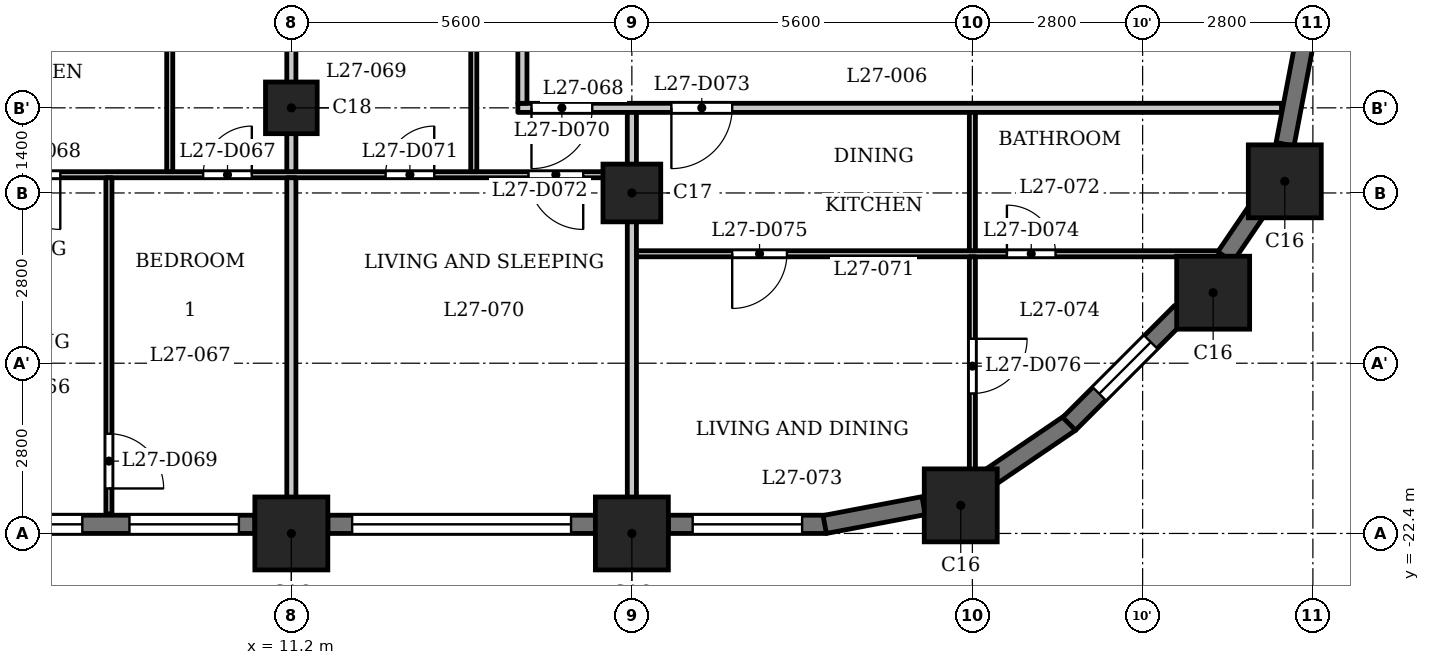
"""IFC4 building model, lengths in metres.
Left out: names, types, materials, properties, quantities, classifications, styles, units other than length and angle.
Written with IfcOpenShell. Run it as: python <this file> out.ifc"""

import sys

from ifc_helpers import new_model, si_unit, direction, frame, frame_2d, origin, origin_2d, place, context, subcontext, project, spatial, rectangle, extrude, element, fill, save


model = new_model("IFC4")
c1 = context("Model", 3, precision=1e-05, world=origin(), true_north=direction((0.0, 1.0)))
c2 = subcontext(c1, "Body", "Model", "MODEL_VIEW")
j1 = project(units=[si_unit("LENGTHUNIT", "METRE"), si_unit("PLANEANGLEUNIT", "RADIAN")], contexts=[c1])
p1 = place(None, origin())
s1 = spatial("IfcSite", under=j1, at=p1, CompositionType="ELEMENT")
p2 = place(p1, origin())
s2 = spatial("IfcBuilding", under=s1, at=p2, CompositionType="ELEMENT")
p3 = place(p2, frame((0.0, 0.0, 107.8)))
s3 = spatial("IfcBuildingStorey", under=s2, at=p3, CompositionType="ELEMENT", Elevation=107.8)
for number, where, z_axis, x_axis in (
    (1, (11.2, -22.4, 0.0), (0.0, 0.0, 1.0), (1.0, 0.0, 0.0)),
    (2, (16.8, -22.4, 0.0), (0.0, 0.0, 1.0), (1.0, 0.0, 0.0)),
    (3, (22.209, -21.938, 0.0), (0.0, 0.0, 1.0), (1.0, 0.0, 0.0)),
    (4, (26.36, -18.44, 0.0), (0.0, 0.0, 1.0), (1.0, 0.0, 0.0)),
    (5, (27.538, -16.609, 0.0), (0.0, 0.0, 1.0), (1.0, 0.0, 0.0)),
):
    element("IfcColumn", number, at=place(p3, frame(where, z_axis=z_axis, x_axis=x_axis)), inside=s3, PredefinedType="COLUMN", context=c2, shape_type="SweptSolid", body=[
        extrude(rectangle(XDim=1.2, YDim=1.2, at=origin_2d()), origin(), (0.0, 0.0, 1.0), 3.5),
    ])
p4 = place(p3, frame((16.8, -16.8, 0.0), z_axis=(0.0, 0.0, 1.0), x_axis=(1.0, 0.0, 0.0)))
e6 = element("IfcColumn", 6, at=p4, inside=s3, PredefinedType="COLUMN", context=c2, shape_type="SweptSolid", body=[
    extrude(rectangle(XDim=0.95, YDim=0.95, at=origin_2d()), origin(), (0.0, 0.0, 1.0), 3.5),
])
p5 = place(p3, frame((11.2, -15.4, 0.0), z_axis=(0.0, 0.0, 1.0), x_axis=(1.0, 0.0, 0.0)))
e7 = element("IfcColumn", 7, at=p5, inside=s3, PredefinedType="COLUMN", context=c2, shape_type="SweptSolid", body=[
    extrude(rectangle(XDim=0.85, YDim=0.85, at=origin_2d()), origin(), (0.0, 0.0, 1.0), 3.5),
])
p6 = place(p3, frame((6.2, -22.25, 0.0), z_axis=(0.0, 0.0, 1.0), x_axis=(1.0, 0.0, 0.0)))
e8 = element("IfcWall", 8, at=p6, inside=s3, PredefinedType="SOLIDWALL", context=c2, shape_type="SweptSolid", body=[
    extrude(rectangle(XDim=4.4, YDim=0.3, at=frame_2d((2.2, 0.0))), origin(), (0.0, 0.0, 1.0), 2.4),
])
p7 = place(p6, frame((0.363, 0.0, 0.6)))
e9 = element("IfcOpeningElement", 9, at=p7, cuts=e8, PredefinedType="OPENING", context=c2, shape_type="SweptSolid", body=[
    extrude(rectangle(XDim=1.2, YDim=1.55, at=frame_2d((0.6, 0.775))), frame((0.0, 0.16, 0.0), z_axis=(0.0, -1.0, 0.0), x_axis=(1.0, 0.0, 0.0)), (0.0, 0.0, 1.0), 0.32),
])
p8 = place(p6, frame((2.337, 0.0, 0.9)))
e10 = element("IfcOpeningElement", 10, at=p8, cuts=e8, PredefinedType="OPENING", context=c2, shape_type="SweptSolid", body=[
    extrude(rectangle(XDim=1.8, YDim=1.25, at=frame_2d((0.9, 0.625))), frame((0.0, 0.16, 0.0), z_axis=(0.0, -1.0, 0.0), x_axis=(1.0, 0.0, 0.0)), (0.0, 0.0, 1.0), 0.32),
])
p9 = place(p3, frame((11.8, -22.25, 0.0), z_axis=(0.0, 0.0, 1.0), x_axis=(1.0, 0.0, 0.0)))
e11 = element("IfcWall", 11, at=p9, inside=s3, PredefinedType="SOLIDWALL", context=c2, shape_type="SweptSolid", body=[
    extrude(rectangle(XDim=4.4, YDim=0.3, at=frame_2d((2.2, 0.0))), origin(), (0.0, 0.0, 1.0), 2.4),
])
p10 = place(p9, frame((0.4, 0.0, 1.2)))
e12 = element("IfcOpeningElement", 12, at=p10, cuts=e11, PredefinedType="OPENING", context=c2, shape_type="SweptSolid", body=[
    extrude(rectangle(XDim=3.6, YDim=0.95, at=frame_2d((1.8, 0.475))), frame((0.0, 0.16, 0.0), z_axis=(0.0, -1.0, 0.0), x_axis=(1.0, 0.0, 0.0)), (0.0, 0.0, 1.0), 0.32),
])
p11 = place(p3, frame((17.4, -22.25, 0.0), z_axis=(0.0, 0.0, 1.0), x_axis=(1.0, 0.0, 0.0)))
e13 = element("IfcWall", 13, at=p11, inside=s3, PredefinedType="SOLIDWALL", context=c2, shape_type="SweptSolid", body=[
    extrude(rectangle(XDim=2.6, YDim=0.3, at=frame_2d((1.3, 0.0))), origin(), (0.0, 0.0, 1.0), 2.4),
])
p12 = place(p11, frame((0.4, 0.0, 0.9)))
e14 = element("IfcOpeningElement", 14, at=p12, cuts=e13, PredefinedType="OPENING", context=c2, shape_type="SweptSolid", body=[
    extrude(rectangle(XDim=1.8, YDim=1.25, at=frame_2d((0.9, 0.625))), frame((0.0, 0.16, 0.0), z_axis=(0.0, -1.0, 0.0), x_axis=(1.0, 0.0, 0.0)), (0.0, 0.0, 1.0), 0.32),
])
for number, where, z_axis, x_axis in (
    (15, (19.972, -22.253, 0.0), (0.0, 0.0, 1.0), (0.982, 0.187, 0.0)),
    (16, (22.643, -21.51, 0.0), (0.0, 0.0, 1.0), (0.827, 0.562, 0.0)),
):
    element("IfcWall", number, at=place(p3, frame(where, z_axis=z_axis, x_axis=x_axis)), inside=s3, PredefinedType="SOLIDWALL", context=c2, shape_type="SweptSolid", body=[
        extrude(rectangle(XDim=1.656, YDim=0.3, at=frame_2d((0.828, 0.0))), origin(), (0.0, 0.0, 1.0), 2.4),
    ])
p13 = place(p3, frame((23.991, -20.597, 0.0), z_axis=(0.0, 0.0, 1.0), x_axis=(0.707106781187, 0.707106781187, 0.0)))
e17 = element("IfcWall", 17, at=p13, inside=s3, PredefinedType="SOLIDWALL", context=c2, shape_type="SweptSolid", body=[
    extrude(rectangle(XDim=2.6, YDim=0.3, at=frame_2d((1.3, 0.0))), origin(), (0.0, 0.0, 1.0), 2.4),
])
p14 = place(p13, frame((0.7, 0.0, 0.6)))
e18 = element("IfcOpeningElement", 18, at=p14, cuts=e17, PredefinedType="OPENING", context=c2, shape_type="SweptSolid", body=[
    extrude(rectangle(XDim=1.2, YDim=1.55, at=frame_2d((0.6, 0.775))), frame((0.0, 0.16, 0.0), z_axis=(0.0, -1.0, 0.0), x_axis=(1.0, 0.0, 0.0)), (0.0, 0.0, 1.0), 0.32),
])
p15 = place(p3, frame((26.561, -17.851, 0.0), z_axis=(0.0, 0.0, 1.0), x_axis=(0.562173331661, 0.827019434577, 0.0)))
e19 = element("IfcWall", 19, at=p15, inside=s3, PredefinedType="SOLIDWALL", context=c2, shape_type="SweptSolid", body=[
    extrude(rectangle(XDim=0.977, YDim=0.3, at=frame_2d((0.489, 0.0))), origin(), (0.0, 0.0, 1.0), 3.2),
])
p16 = place(p3, frame((27.542, -15.999, 0.0), z_axis=(0.0, 0.0, 1.0), x_axis=(0.187349172861, 0.982293381546, 0.0)))
e20 = element("IfcWall", 20, at=p16, inside=s3, PredefinedType="SOLIDWALL", context=c2, shape_type="SweptSolid", body=[
    extrude(rectangle(XDim=1.656, YDim=0.3, at=frame_2d((0.828, 0.0))), origin(), (0.0, 0.0, 1.0), 2.4),
])
p17 = place(p3, frame((16.875, -17.8, 0.0), z_axis=(0.0, 0.0, 1.0), x_axis=(1.0, 0.0, 0.0)))
e21 = element("IfcWall", 21, at=p17, inside=s3, PredefinedType="PARTITIONING", context=c2, shape_type="SweptSolid", body=[
    extrude(rectangle(XDim=9.59, YDim=0.1, at=frame_2d((4.795, 0.0))), origin(), (0.0, 0.0, 1.0), 3.2),
])
p18 = place(p17, frame((6.093, 0.0, 0.0)))
e22 = element("IfcOpeningElement", 22, at=p18, cuts=e21, PredefinedType="OPENING", context=c2, shape_type="SweptSolid", body=[
    extrude(rectangle(XDim=0.8, YDim=2.1, at=frame_2d((0.4, 1.05))), frame((0.0, 0.06, 0.0), z_axis=(0.0, -1.0, 0.0), x_axis=(1.0, 0.0, 0.0)), (0.0, 0.0, 1.0), 0.12),
])
p19 = place(p17, frame((1.575, 0.0, 0.0)))
e23 = element("IfcOpeningElement", 23, at=p19, cuts=e21, PredefinedType="OPENING", context=c2, shape_type="SweptSolid", body=[
    extrude(rectangle(XDim=0.9, YDim=2.1, at=frame_2d((0.45, 1.05))), frame((0.0, 0.06, 0.0), z_axis=(0.0, -1.0, 0.0), x_axis=(1.0, 0.0, 0.0)), (0.0, 0.0, 1.0), 0.12),
])
p20 = place(p3, frame((-16.725, -16.5, 0.0), z_axis=(0.0, 0.0, 1.0), x_axis=(1.0, 0.0, 0.0)))
e24 = element("IfcWall", 24, at=p20, inside=s3, PredefinedType="PARTITIONING", context=c2, shape_type="SweptSolid", body=[
    extrude(rectangle(XDim=33.45, YDim=0.1, at=frame_2d((16.725, 0.0))), origin(), (0.0, 0.0, 1.0), 3.2),
])
p21 = place(p20, frame((4.075, 0.0, 0.0)))
e25 = element("IfcOpeningElement", 25, at=p21, cuts=e24, PredefinedType="OPENING", context=c2, shape_type="SweptSolid", body=[
    extrude(rectangle(XDim=0.8, YDim=2.1, at=frame_2d((0.4, 1.05))), frame((0.0, 0.06, 0.0), z_axis=(0.0, -1.0, 0.0), x_axis=(1.0, 0.0, 0.0)), (0.0, 0.0, 1.0), 0.12),
])
p22 = place(p20, frame((1.075, 0.0, 0.0)))
e26 = element("IfcOpeningElement", 26, at=p22, cuts=e24, PredefinedType="OPENING", context=c2, shape_type="SweptSolid", body=[
    extrude(rectangle(XDim=0.9, YDim=2.1, at=frame_2d((0.45, 1.05))), frame((0.0, 0.06, 0.0), z_axis=(0.0, -1.0, 0.0), x_axis=(1.0, 0.0, 0.0)), (0.0, 0.0, 1.0), 0.12),
])
p23 = place(p20, frame((9.675, 0.0, 0.0)))
e27 = element("IfcOpeningElement", 27, at=p23, cuts=e24, PredefinedType="OPENING", context=c2, shape_type="SweptSolid", body=[
    extrude(rectangle(XDim=0.8, YDim=2.1, at=frame_2d((0.4, 1.05))), frame((0.0, 0.06, 0.0), z_axis=(0.0, -1.0, 0.0), x_axis=(1.0, 0.0, 0.0)), (0.0, 0.0, 1.0), 0.12),
])
p24 = place(p20, frame((7.675, 0.0, 0.0)))
e28 = element("IfcOpeningElement", 28, at=p24, cuts=e24, PredefinedType="OPENING", context=c2, shape_type="SweptSolid", body=[
    extrude(rectangle(XDim=0.9, YDim=2.1, at=frame_2d((0.45, 1.05))), frame((0.0, 0.06, 0.0), z_axis=(0.0, -1.0, 0.0), x_axis=(1.0, 0.0, 0.0)), (0.0, 0.0, 1.0), 0.12),
])
p25 = place(p20, frame((15.275, 0.0, 0.0)))
e29 = element("IfcOpeningElement", 29, at=p25, cuts=e24, PredefinedType="OPENING", context=c2, shape_type="SweptSolid", body=[
    extrude(rectangle(XDim=0.8, YDim=2.1, at=frame_2d((0.4, 1.05))), frame((0.0, 0.06, 0.0), z_axis=(0.0, -1.0, 0.0), x_axis=(1.0, 0.0, 0.0)), (0.0, 0.0, 1.0), 0.12),
])
p26 = place(p20, frame((11.775, 0.0, 0.0)))
e30 = element("IfcOpeningElement", 30, at=p26, cuts=e24, PredefinedType="OPENING", context=c2, shape_type="SweptSolid", body=[
    extrude(rectangle(XDim=0.9, YDim=2.1, at=frame_2d((0.45, 1.05))), frame((0.0, 0.06, 0.0), z_axis=(0.0, -1.0, 0.0), x_axis=(1.0, 0.0, 0.0)), (0.0, 0.0, 1.0), 0.12),
])
p27 = place(p20, frame((20.625, 0.0, 0.0)))
e31 = element("IfcOpeningElement", 31, at=p27, cuts=e24, PredefinedType="OPENING", context=c2, shape_type="SweptSolid", body=[
    extrude(rectangle(XDim=0.8, YDim=2.1, at=frame_2d((0.4, 1.05))), frame((0.0, 0.06, 0.0), z_axis=(0.0, -1.0, 0.0), x_axis=(1.0, 0.0, 0.0)), (0.0, 0.0, 1.0), 0.12),
])
p28 = place(p20, frame((18.375, 0.0, 0.0)))
e32 = element("IfcOpeningElement", 32, at=p28, cuts=e24, PredefinedType="OPENING", context=c2, shape_type="SweptSolid", body=[
    extrude(rectangle(XDim=0.9, YDim=2.1, at=frame_2d((0.45, 1.05))), frame((0.0, 0.06, 0.0), z_axis=(0.0, -1.0, 0.0), x_axis=(1.0, 0.0, 0.0)), (0.0, 0.0, 1.0), 0.12),
])
p29 = place(p20, frame((26.475, 0.0, 0.0)))
e33 = element("IfcOpeningElement", 33, at=p29, cuts=e24, PredefinedType="OPENING", context=c2, shape_type="SweptSolid", body=[
    extrude(rectangle(XDim=0.8, YDim=2.1, at=frame_2d((0.4, 1.05))), frame((0.0, 0.06, 0.0), z_axis=(0.0, -1.0, 0.0), x_axis=(1.0, 0.0, 0.0)), (0.0, 0.0, 1.0), 0.12),
])
p30 = place(p20, frame((23.225, 0.0, 0.0)))
e34 = element("IfcOpeningElement", 34, at=p30, cuts=e24, PredefinedType="OPENING", context=c2, shape_type="SweptSolid", body=[
    extrude(rectangle(XDim=0.9, YDim=2.1, at=frame_2d((0.45, 1.05))), frame((0.0, 0.06, 0.0), z_axis=(0.0, -1.0, 0.0), x_axis=(1.0, 0.0, 0.0)), (0.0, 0.0, 1.0), 0.12),
])
p31 = place(p20, frame((29.475, 0.0, 0.0)))
e35 = element("IfcOpeningElement", 35, at=p31, cuts=e24, PredefinedType="OPENING", context=c2, shape_type="SweptSolid", body=[
    extrude(rectangle(XDim=0.8, YDim=2.1, at=frame_2d((0.4, 1.05))), frame((0.0, 0.06, 0.0), z_axis=(0.0, -1.0, 0.0), x_axis=(1.0, 0.0, 0.0)), (0.0, 0.0, 1.0), 0.12),
])
p32 = place(p20, frame((31.825, 0.0, 0.0)))
e36 = element("IfcOpeningElement", 36, at=p32, cuts=e24, PredefinedType="OPENING", context=c2, shape_type="SweptSolid", body=[
    extrude(rectangle(XDim=0.9, YDim=2.1, at=frame_2d((0.45, 1.05))), frame((0.0, 0.06, 0.0), z_axis=(0.0, -1.0, 0.0), x_axis=(1.0, 0.0, 0.0)), (0.0, 0.0, 1.0), 0.12),
])
p33 = place(p3, frame((14.925, -15.4, 0.0), z_axis=(0.0, 0.0, 1.0), x_axis=(1.0, 0.0, 0.0)))
e37 = element("IfcWall", 37, at=p33, inside=s3, PredefinedType="PARTITIONING", context=c2, shape_type="SweptSolid", body=[
    extrude(rectangle(XDim=12.559, YDim=0.15, at=frame_2d((6.279, 0.0))), origin(), (0.0, 0.0, 1.0), 3.2),
])
p34 = place(p33, frame((0.224, 0.0, 0.0)))
e38 = element("IfcOpeningElement", 38, at=p34, cuts=e37, PredefinedType="OPENING", context=c2, shape_type="SweptSolid", body=[
    extrude(rectangle(XDim=1.0, YDim=2.1, at=frame_2d((0.5, 1.05))), frame((0.0, 0.085, 0.0), z_axis=(0.0, -1.0, 0.0), x_axis=(1.0, 0.0, 0.0)), (0.0, 0.0, 1.0), 0.17),
])
p35 = place(p33, frame((2.525, 0.0, 0.0)))
e39 = element("IfcOpeningElement", 39, at=p35, cuts=e37, PredefinedType="OPENING", context=c2, shape_type="SweptSolid", body=[
    extrude(rectangle(XDim=1.0, YDim=2.1, at=frame_2d((0.5, 1.05))), frame((0.0, 0.085, 0.0), z_axis=(0.0, -1.0, 0.0), x_axis=(1.0, 0.0, 0.0)), (0.0, 0.0, 1.0), 0.17),
])
p36 = place(p3, frame((8.2, -22.08, 0.0), z_axis=(0.0, 0.0, 1.0), x_axis=(0.0, 1.0, 0.0)))
e40 = element("IfcWall", 40, at=p36, inside=s3, PredefinedType="PARTITIONING", context=c2, shape_type="SweptSolid", body=[
    extrude(rectangle(XDim=5.53, YDim=0.1, at=frame_2d((2.765, 0.0))), origin(), (0.0, 0.0, 1.0), 3.2),
])
p37 = place(p36, frame((0.42, 0.0, 0.0)))
e41 = element("IfcOpeningElement", 41, at=p37, cuts=e40, PredefinedType="OPENING", context=c2, shape_type="SweptSolid", body=[
    extrude(rectangle(XDim=0.9, YDim=2.1, at=frame_2d((0.45, 1.05))), frame((0.0, 0.06, 0.0), z_axis=(0.0, -1.0, 0.0), x_axis=(1.0, 0.0, 0.0)), (0.0, 0.0, 1.0), 0.12),
])
p38 = place(p3, frame((9.2, -16.45, 0.0), z_axis=(0.0, 0.0, 1.0), x_axis=(0.0, 1.0, 0.0)))
e42 = element("IfcWall", 42, at=p38, inside=s3, PredefinedType="PARTITIONING", context=c2, shape_type="SweptSolid", body=[
    extrude(rectangle(XDim=3.175, YDim=0.1, at=frame_2d((1.587, 0.0))), origin(), (0.0, 0.0, 1.0), 3.2),
])
p39 = place(p3, frame((11.2, -22.98, 0.0), z_axis=(0.0, 0.0, 1.0), x_axis=(0.0, 1.0, 0.0)))
e43 = element("IfcWall", 43, at=p39, inside=s3, PredefinedType="PARTITIONING", context=c2, shape_type="SweptSolid", body=[
    extrude(rectangle(XDim=6.43, YDim=0.15, at=frame_2d((3.215, 0.0))), origin(), (0.0, 0.0, 1.0), 3.2),
])
p40 = place(p3, frame((11.2, -16.45, 0.0), z_axis=(0.0, 0.0, 1.0), x_axis=(0.0, 1.0, 0.0)))
e44 = element("IfcWall", 44, at=p40, inside=s3, PredefinedType="PARTITIONING", context=c2, shape_type="SweptSolid", body=[
    extrude(rectangle(XDim=3.175, YDim=0.15, at=frame_2d((1.587, 0.0))), origin(), (0.0, 0.0, 1.0), 3.2),
])
p41 = place(p3, frame((14.2, -16.45, 0.0), z_axis=(0.0, 0.0, 1.0), x_axis=(0.0, 1.0, 0.0)))
e45 = element("IfcWall", 45, at=p41, inside=s3, PredefinedType="PARTITIONING", context=c2, shape_type="SweptSolid", body=[
    extrude(rectangle(XDim=3.175, YDim=0.1, at=frame_2d((1.587, 0.0))), origin(), (0.0, 0.0, 1.0), 3.2),
])
p42 = place(p3, frame((15.0, -15.325, 0.0), z_axis=(0.0, 0.0, 1.0), x_axis=(0.0, 1.0, 0.0)))
e46 = element("IfcWall", 46, at=p42, inside=s3, PredefinedType="PARTITIONING", context=c2, shape_type="SweptSolid", body=[
    extrude(rectangle(XDim=2.05, YDim=0.15, at=frame_2d((1.025, 0.0))), origin(), (0.0, 0.0, 1.0), 3.2),
])
p43 = place(p3, frame((16.8, -22.98, 0.0), z_axis=(0.0, 0.0, 1.0), x_axis=(0.0, 1.0, 0.0)))
e47 = element("IfcWall", 47, at=p43, inside=s3, PredefinedType="PARTITIONING", context=c2, shape_type="SweptSolid", body=[
    extrude(rectangle(XDim=7.505, YDim=0.15, at=frame_2d((3.752, 0.0))), origin(), (0.0, 0.0, 1.0), 3.2),
])
p44 = place(p3, frame((22.4, -21.72, 0.0), z_axis=(0.0, 0.0, 1.0), x_axis=(0.0, 1.0, 0.0)))
e48 = element("IfcWall", 48, at=p44, inside=s3, PredefinedType="PARTITIONING", context=c2, shape_type="SweptSolid", body=[
    extrude(rectangle(XDim=3.87, YDim=0.1, at=frame_2d((1.935, 0.0))), origin(), (0.0, 0.0, 1.0), 3.2),
])
p45 = place(p44, frame((1.622, 0.0, 0.0)))
e49 = element("IfcOpeningElement", 49, at=p45, cuts=e48, PredefinedType="OPENING", context=c2, shape_type="SweptSolid", body=[
    extrude(rectangle(XDim=0.9, YDim=2.1, at=frame_2d((0.45, 1.05))), frame((0.0, 0.06, 0.0), z_axis=(0.0, -1.0, 0.0), x_axis=(1.0, 0.0, 0.0)), (0.0, 0.0, 1.0), 0.12),
])
p46 = place(p3, frame((22.4, -17.75, 0.0), z_axis=(0.0, 0.0, 1.0), x_axis=(0.0, 1.0, 0.0)))
e50 = element("IfcWall", 50, at=p46, inside=s3, PredefinedType="PARTITIONING", context=c2, shape_type="SweptSolid", body=[
    extrude(rectangle(XDim=2.275, YDim=0.1, at=frame_2d((1.137, 0.0))), origin(), (0.0, 0.0, 1.0), 3.2),
])
p47 = place(p29, origin())
e51 = element("IfcDoor", 51, at=p47, inside=s3, OperationType="SINGLE_SWING_LEFT", PredefinedType="DOOR", context=c2, shape_type="SweptSolid", body=[
    extrude(rectangle(XDim=0.8, YDim=2.1, at=frame_2d((0.4, 1.05))), frame((0.0, 0.025, 0.0), z_axis=(0.0, -1.0, 0.0), x_axis=(1.0, 0.0, 0.0)), (0.0, 0.0, 1.0), 0.05),
])
fill(e33, e51)
p48 = place(p30, origin())
e52 = element("IfcDoor", 52, at=p48, inside=s3, OperationType="SINGLE_SWING_RIGHT", PredefinedType="DOOR", context=c2, shape_type="SweptSolid", body=[
    extrude(rectangle(XDim=0.9, YDim=2.1, at=frame_2d((0.45, 1.05))), frame((0.0, 0.025, 0.0), z_axis=(0.0, -1.0, 0.0), x_axis=(1.0, 0.0, 0.0)), (0.0, 0.0, 1.0), 0.05),
])
fill(e34, e52)
p49 = place(p37, origin())
e53 = element("IfcDoor", 53, at=p49, inside=s3, OperationType="SINGLE_SWING_LEFT", PredefinedType="DOOR", context=c2, shape_type="SweptSolid", body=[
    extrude(rectangle(XDim=0.9, YDim=2.1, at=frame_2d((0.45, 1.05))), frame((0.0, 0.025, 0.0), z_axis=(0.0, -1.0, 0.0), x_axis=(1.0, 0.0, 0.0)), (0.0, 0.0, 1.0), 0.05),
])
fill(e41, e53)
p50 = place(p34, origin())
e54 = element("IfcDoor", 54, at=p50, inside=s3, OperationType="SINGLE_SWING_LEFT", PredefinedType="DOOR", context=c2, shape_type="SweptSolid", body=[
    extrude(rectangle(XDim=1.0, YDim=2.1, at=frame_2d((0.5, 1.05))), frame((0.0, 0.025, 0.0), z_axis=(0.0, -1.0, 0.0), x_axis=(1.0, 0.0, 0.0)), (0.0, 0.0, 1.0), 0.05),
])
fill(e38, e54)
p51 = place(p31, origin())
e55 = element("IfcDoor", 55, at=p51, inside=s3, OperationType="SINGLE_SWING_LEFT", PredefinedType="DOOR", context=c2, shape_type="SweptSolid", body=[
    extrude(rectangle(XDim=0.8, YDim=2.1, at=frame_2d((0.4, 1.05))), frame((0.0, 0.025, 0.0), z_axis=(0.0, -1.0, 0.0), x_axis=(1.0, 0.0, 0.0)), (0.0, 0.0, 1.0), 0.05),
])
fill(e35, e55)
p52 = place(p32, origin())
e56 = element("IfcDoor", 56, at=p52, inside=s3, OperationType="SINGLE_SWING_RIGHT", PredefinedType="DOOR", context=c2, shape_type="SweptSolid", body=[
    extrude(rectangle(XDim=0.9, YDim=2.1, at=frame_2d((0.45, 1.05))), frame((0.0, 0.025, 0.0), z_axis=(0.0, -1.0, 0.0), x_axis=(1.0, 0.0, 0.0)), (0.0, 0.0, 1.0), 0.05),
])
fill(e36, e56)
p53 = place(p35, origin())
e57 = element("IfcDoor", 57, at=p53, inside=s3, OperationType="SINGLE_SWING_LEFT", PredefinedType="DOOR", context=c2, shape_type="SweptSolid", body=[
    extrude(rectangle(XDim=1.0, YDim=2.1, at=frame_2d((0.5, 1.05))), frame((0.0, 0.025, 0.0), z_axis=(0.0, -1.0, 0.0), x_axis=(1.0, 0.0, 0.0)), (0.0, 0.0, 1.0), 0.05),
])
fill(e39, e57)
p54 = place(p18, origin())
e58 = element("IfcDoor", 58, at=p54, inside=s3, OperationType="SINGLE_SWING_RIGHT", PredefinedType="DOOR", context=c2, shape_type="SweptSolid", body=[
    extrude(rectangle(XDim=0.8, YDim=2.1, at=frame_2d((0.4, 1.05))), frame((0.0, 0.025, 0.0), z_axis=(0.0, -1.0, 0.0), x_axis=(1.0, 0.0, 0.0)), (0.0, 0.0, 1.0), 0.05),
])
fill(e22, e58)
p55 = place(p19, origin())
e59 = element("IfcDoor", 59, at=p55, inside=s3, OperationType="SINGLE_SWING_LEFT", PredefinedType="DOOR", context=c2, shape_type="SweptSolid", body=[
    extrude(rectangle(XDim=0.9, YDim=2.1, at=frame_2d((0.45, 1.05))), frame((0.0, 0.025, 0.0), z_axis=(0.0, -1.0, 0.0), x_axis=(1.0, 0.0, 0.0)), (0.0, 0.0, 1.0), 0.05),
])
fill(e23, e59)
p56 = place(p45, origin())
e60 = element("IfcDoor", 60, at=p56, inside=s3, OperationType="SINGLE_SWING_RIGHT", PredefinedType="DOOR", context=c2, shape_type="SweptSolid", body=[
    extrude(rectangle(XDim=0.9, YDim=2.1, at=frame_2d((0.45, 1.05))), frame((0.0, 0.025, 0.0), z_axis=(0.0, -1.0, 0.0), x_axis=(1.0, 0.0, 0.0)), (0.0, 0.0, 1.0), 0.05),
])
fill(e49, e60)
p57 = place(p7, origin())
e61 = element("IfcWindow", 61, at=p57, inside=s3, PartitioningType="SINGLE_PANEL", PredefinedType="WINDOW", context=c2, shape_type="SweptSolid", body=[
    extrude(rectangle(XDim=1.2, YDim=1.55, at=frame_2d((0.6, 0.775))), frame((0.0, 0.03, 0.0), z_axis=(0.0, -1.0, 0.0), x_axis=(1.0, 0.0, 0.0)), (0.0, 0.0, 1.0), 0.06),
])
fill(e9, e61)
p58 = place(p8, origin())
e62 = element("IfcWindow", 62, at=p58, inside=s3, PartitioningType="SINGLE_PANEL", PredefinedType="WINDOW", context=c2, shape_type="SweptSolid", body=[
    extrude(rectangle(XDim=1.8, YDim=1.25, at=frame_2d((0.9, 0.625))), frame((0.0, 0.03, 0.0), z_axis=(0.0, -1.0, 0.0), x_axis=(1.0, 0.0, 0.0)), (0.0, 0.0, 1.0), 0.06),
])
fill(e10, e62)
p59 = place(p10, origin())
e63 = element("IfcWindow", 63, at=p59, inside=s3, PartitioningType="SINGLE_PANEL", PredefinedType="WINDOW", context=c2, shape_type="SweptSolid", body=[
    extrude(rectangle(XDim=3.6, YDim=0.95, at=frame_2d((1.8, 0.475))), frame((0.0, 0.03, 0.0), z_axis=(0.0, -1.0, 0.0), x_axis=(1.0, 0.0, 0.0)), (0.0, 0.0, 1.0), 0.06),
])
fill(e12, e63)
p60 = place(p12, origin())
e64 = element("IfcWindow", 64, at=p60, inside=s3, PartitioningType="SINGLE_PANEL", PredefinedType="WINDOW", context=c2, shape_type="SweptSolid", body=[
    extrude(rectangle(XDim=1.8, YDim=1.25, at=frame_2d((0.9, 0.625))), frame((0.0, 0.03, 0.0), z_axis=(0.0, -1.0, 0.0), x_axis=(1.0, 0.0, 0.0)), (0.0, 0.0, 1.0), 0.06),
])
fill(e14, e64)
p61 = place(p14, origin())
e65 = element("IfcWindow", 65, at=p61, inside=s3, PartitioningType="SINGLE_PANEL", PredefinedType="WINDOW", context=c2, shape_type="SweptSolid", body=[
    extrude(rectangle(XDim=1.2, YDim=1.55, at=frame_2d((0.6, 0.775))), frame((0.0, 0.03, 0.0), z_axis=(0.0, -1.0, 0.0), x_axis=(1.0, 0.0, 0.0)), (0.0, 0.0, 1.0), 0.06),
])
fill(e18, e65)
save(model, sys.argv[1])
